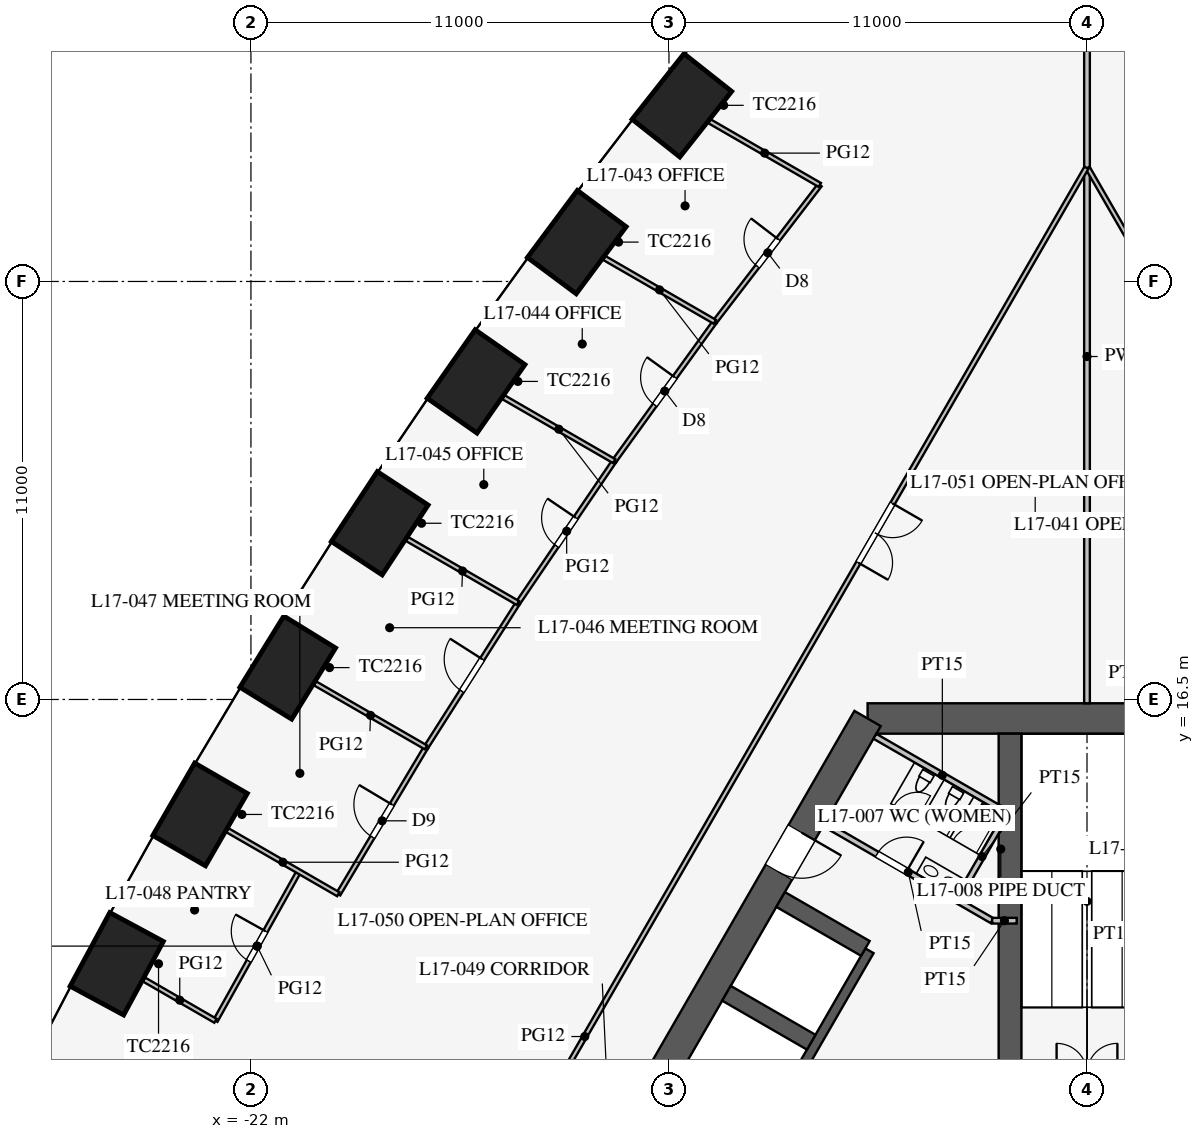
"""IFC4 building model, lengths in metres.
Left out: names, types, materials, properties, quantities, classifications, styles, units other than length and angle.
Written with IfcOpenShell. Run it as: python <this file> out.ifc"""

import sys

from ifc_helpers import new_model, si_unit, direction, frame, frame_2d, origin, origin_2d, place, context, subcontext, project, spatial, rectangle, extrude, element, fill, save


model = new_model("IFC4")
c1 = context("Model", 3, precision=1e-05, world=origin(), true_north=direction((0.0, 1.0)))
c2 = subcontext(c1, "Body", "Model", "MODEL_VIEW")
j1 = project(units=[si_unit("LENGTHUNIT", "METRE"), si_unit("PLANEANGLEUNIT", "RADIAN")], contexts=[c1])
p1 = place(None, origin())
s1 = spatial("IfcSite", under=j1, at=p1, CompositionType="ELEMENT")
p2 = place(p1, origin())
s2 = spatial("IfcBuilding", under=s1, at=p2, CompositionType="ELEMENT")
p3 = place(p2, frame((0.0, 0.0, 75.3)))
s3 = spatial("IfcBuildingStorey", under=s2, at=p3, CompositionType="ELEMENT", Elevation=75.3)
for number, where, z_axis, x_axis in (
    (1, (-10.66, 32.135, 0.0), (0.0, 0.0, 1.0), (-0.62, -0.784, 0.0)),
    (2, (-13.426, 28.536, 0.0), (0.0, 0.0, 1.0), (-0.597, -0.802, 0.0)),
    (3, (-16.076, 24.87, 0.0), (0.0, 0.0, 1.0), (-0.574, -0.819, 0.0)),
    (4, (-18.611, 21.137, 0.0), (0.0, 0.0, 1.0), (-0.549, -0.836, 0.0)),
    (5, (-21.031, 17.339, 0.0), (0.0, 0.0, 1.0), (-0.525, -0.851, 0.0)),
    (6, (-23.338, 13.474, 0.0), (0.0, 0.0, 1.0), (-0.5, -0.866, 0.0)),
    (7, (-25.531, 9.544, 0.0), (0.0, 0.0, 1.0), (-0.475, -0.88, 0.0)),
):
    element("IfcColumn", number, at=place(p3, frame(where, z_axis=z_axis, x_axis=x_axis)), inside=s3, PredefinedType="COLUMN", context=c2, shape_type="SweptSolid", body=[
        extrude(rectangle(XDim=2.2, YDim=1.6, at=origin_2d()), origin(), (0.0, 0.0, 1.0), 4.2),
    ])
p4 = place(p3, frame((5.773, 16.0, 0.0), z_axis=(0.0, 0.0, 1.0), x_axis=(-1.0, 0.0, 0.0)))
e8 = element("IfcWall", 8, at=p4, inside=s3, PredefinedType="SHEAR", context=c2, shape_type="SweptSolid", body=[
    extrude(rectangle(XDim=11.547, YDim=0.8, at=frame_2d((5.773, 0.0))), origin(), (0.0, 0.0, 1.0), 4.2),
])
p5 = place(p3, frame((-5.773, 16.0, 0.0), z_axis=(0.0, 0.0, 1.0), x_axis=(-0.500002442456, -0.866023993627, 0.0)))
e9 = element("IfcWall", 9, at=p5, inside=s3, PredefinedType="SHEAR", context=c2, shape_type="SweptSolid", body=[
    extrude(rectangle(XDim=21.939, YDim=0.8, at=frame_2d((10.97, 0.0))), origin(), (0.0, 0.0, 1.0), 4.2),
])
p6 = place(p5, frame((17.27, 0.0, 0.0)))
e10 = element("IfcOpeningElement", 10, at=p6, cuts=e9, PredefinedType="OPENING", context=c2, shape_type="SweptSolid", body=[
    extrude(rectangle(XDim=1.2, YDim=2.1, at=frame_2d((0.6, 1.05))), frame((0.0, 0.41, 0.0), z_axis=(0.0, -1.0, 0.0), x_axis=(1.0, 0.0, 0.0)), (0.0, 0.0, 1.0), 0.82),
])
p7 = place(p5, frame((3.47, 0.0, 0.0)))
e11 = element("IfcOpeningElement", 11, at=p7, cuts=e9, PredefinedType="OPENING", context=c2, shape_type="SweptSolid", body=[
    extrude(rectangle(XDim=1.2, YDim=2.1, at=frame_2d((0.6, 1.05))), frame((0.0, 0.41, 0.0), z_axis=(0.0, -1.0, 0.0), x_axis=(1.0, 0.0, 0.0)), (0.0, 0.0, 1.0), 0.82),
])
p8 = place(p3, frame((-5.724, 9.886, 0.0), z_axis=(0.0, 0.0, 1.0), x_axis=(-0.500001763848, -0.866024385424, 0.0)))
e12 = element("IfcWall", 12, at=p8, inside=s3, PredefinedType="SHEAR", context=c2, shape_type="SweptSolid", body=[
    extrude(rectangle(XDim=11.4, YDim=0.25, at=frame_2d((5.7, 0.0))), origin(), (0.0, 0.0, 1.0), 4.2),
])
p9 = place(p8, frame((6.525, 0.0, 0.0)))
e13 = element("IfcOpeningElement", 13, at=p9, cuts=e12, PredefinedType="OPENING", context=c2, shape_type="SweptSolid", body=[
    extrude(rectangle(XDim=1.2, YDim=2.2, at=frame_2d((0.6, 1.1))), frame((0.0, 0.135, 0.0), z_axis=(0.0, -1.0, 0.0), x_axis=(1.0, 0.0, 0.0)), (0.0, 0.0, 1.0), 0.27),
])
p10 = place(p8, frame((9.375, 0.0, 0.0)))
e14 = element("IfcOpeningElement", 14, at=p10, cuts=e12, PredefinedType="OPENING", context=c2, shape_type="SweptSolid", body=[
    extrude(rectangle(XDim=1.2, YDim=2.2, at=frame_2d((0.6, 1.1))), frame((0.0, 0.135, 0.0), z_axis=(0.0, -1.0, 0.0), x_axis=(1.0, 0.0, 0.0)), (0.0, 0.0, 1.0), 0.27),
])
p11 = place(p3, frame((-5.832, 9.949, 0.0), z_axis=(0.0, 0.0, 1.0), x_axis=(-0.866029291668, 0.499993265928, 0.0)))
e15 = element("IfcWall", 15, at=p11, inside=s3, PredefinedType="SHEAR", context=c2, shape_type="SweptSolid", body=[
    extrude(rectangle(XDim=2.575, YDim=0.45, at=frame_2d((1.288, 0.0))), origin(), (0.0, 0.0, 1.0), 4.2),
])
p12 = place(p3, frame((-7.257, 7.481, 0.0), z_axis=(0.0, 0.0, 1.0), x_axis=(-0.866046643894, 0.499963209246, 0.0)))
e16 = element("IfcWall", 16, at=p12, inside=s3, PredefinedType="SHEAR", context=c2, shape_type="SweptSolid", body=[
    extrude(rectangle(XDim=2.575, YDim=0.45, at=frame_2d((1.288, 0.0))), origin(), (0.0, 0.0, 1.0), 4.2),
])
p13 = place(p3, frame((-2.025, 6.525, 0.0), z_axis=(0.0, 0.0, 1.0), x_axis=(0.0, 1.0, 0.0)))
e17 = element("IfcWall", 17, at=p13, inside=s3, PredefinedType="SHEAR", context=c2, shape_type="SweptSolid", body=[
    extrude(rectangle(XDim=9.075, YDim=0.6, at=frame_2d((4.538, 0.0))), origin(), (0.0, 0.0, 1.0), 4.2),
])
p14 = place(p3, frame((-2.495, 10.678, 0.0), z_axis=(0.0, 0.0, 1.0), x_axis=(-0.86602216432, 0.500005610874, 0.0)))
e18 = element("IfcWall", 18, at=p14, inside=s3, PredefinedType="PARTITIONING", context=c2, shape_type="SweptSolid", body=[
    extrude(rectangle(XDim=5.1, YDim=0.15, at=frame_2d((2.55, 0.0))), origin(), (0.0, 0.0, 1.0), 4.0),
])
p15 = place(p14, frame((2.6, 0.0, 0.0)))
e19 = element("IfcOpeningElement", 19, at=p15, cuts=e18, PredefinedType="OPENING", context=c2, shape_type="SweptSolid", body=[
    extrude(rectangle(XDim=0.9, YDim=2.1, at=frame_2d((0.45, 1.05))), frame((0.0, 0.085, 0.0), z_axis=(0.0, -1.0, 0.0), x_axis=(1.0, 0.0, 0.0)), (0.0, 0.0, 1.0), 0.17),
])
p16 = place(p3, frame((-2.495, 10.678, 0.0), z_axis=(0.0, 0.0, 1.0), x_axis=(1.0, 0.0, 0.0)))
e20 = element("IfcWall", 20, at=p16, inside=s3, PredefinedType="PARTITIONING", context=c2, shape_type="SweptSolid", body=[
    extrude(rectangle(XDim=0.645, YDim=0.15, at=frame_2d((0.323, 0.0))), origin(), (0.0, 0.0, 1.0), 4.0),
])
p17 = place(p3, frame((-2.031, 13.482, 0.0), z_axis=(0.0, 0.0, 1.0), x_axis=(-0.866050731258, 0.499956128963, 0.0)))
e21 = element("IfcWall", 21, at=p17, inside=s3, PredefinedType="PARTITIONING", context=c2, shape_type="SweptSolid", body=[
    extrude(rectangle(XDim=4.1, YDim=0.15, at=frame_2d((2.05, 0.0))), origin(), (0.0, 0.0, 1.0), 4.0),
])
p18 = place(p3, frame((-3.389, 11.281, 0.0), z_axis=(0.0, 0.0, 1.0), x_axis=(0.499989096993, 0.866031698547, 0.0)))
e22 = element("IfcWall", 22, at=p18, inside=s3, PredefinedType="PARTITIONING", context=c2, shape_type="SweptSolid", body=[
    extrude(rectangle(XDim=2.51, YDim=0.15, at=frame_2d((1.255, 0.0))), origin(), (0.0, 0.0, 1.0), 4.0),
])
p19 = place(p3, frame((0.0, 16.4, 0.0), z_axis=(0.0, 0.0, 1.0), x_axis=(0.0, 1.0, 0.0)))
e23 = element("IfcWall", 23, at=p19, inside=s3, PredefinedType="PARTITIONING", context=c2, shape_type="SweptSolid", body=[
    extrude(rectangle(XDim=18.25, YDim=0.15, at=frame_2d((9.125, 0.0))), origin(), (0.0, 0.0, 1.0), 2.3),
])
p20 = place(p3, frame((26.415, -15.231, 0.0), z_axis=(0.0, 0.0, 1.0), x_axis=(-0.50000091641, 0.866024874695, 0.0)))
e24 = element("IfcWall", 24, at=p20, inside=s3, PredefinedType="PARTITIONING", context=c2, shape_type="SweptSolid", body=[
    extrude(rectangle(XDim=52.796, YDim=0.12, at=frame_2d((26.398, 0.0))), origin(), (0.0, 0.0, 1.0), 2.9),
])
p21 = place(p20, frame((10.2, 0.0, 0.15)))
e25 = element("IfcOpeningElement", 25, at=p21, cuts=e24, PredefinedType="OPENING", context=c2, shape_type="SweptSolid", body=[
    extrude(rectangle(XDim=1.8, YDim=2.1, at=frame_2d((0.9, 1.05))), frame((0.0, 0.07, 0.0), z_axis=(0.0, -1.0, 0.0), x_axis=(1.0, 0.0, 0.0)), (0.0, 0.0, 1.0), 0.14),
])
p22 = place(p20, frame((40.8, 0.0, 0.15)))
e26 = element("IfcOpeningElement", 26, at=p22, cuts=e24, PredefinedType="OPENING", context=c2, shape_type="SweptSolid", body=[
    extrude(rectangle(XDim=1.8, YDim=2.1, at=frame_2d((0.9, 1.05))), frame((0.0, 0.07, 0.0), z_axis=(0.0, -1.0, 0.0), x_axis=(1.0, 0.0, 0.0)), (0.0, 0.0, 1.0), 0.14),
])
p23 = place(p3, frame((-0.016, 30.491, 0.0), z_axis=(0.0, 0.0, 1.0), x_axis=(-0.50000091641, -0.866024874695, 0.0)))
e27 = element("IfcWall", 27, at=p23, inside=s3, PredefinedType="PARTITIONING", context=c2, shape_type="SweptSolid", body=[
    extrude(rectangle(XDim=52.796, YDim=0.12, at=frame_2d((26.398, 0.0))), origin(), (0.0, 0.0, 1.0), 2.9),
])
p24 = place(p23, frame((10.2, 0.0, 0.15)))
e28 = element("IfcOpeningElement", 28, at=p24, cuts=e27, PredefinedType="OPENING", context=c2, shape_type="SweptSolid", body=[
    extrude(rectangle(XDim=1.8, YDim=2.1, at=frame_2d((0.9, 1.05))), frame((0.0, 0.07, 0.0), z_axis=(0.0, -1.0, 0.0), x_axis=(1.0, 0.0, 0.0)), (0.0, 0.0, 1.0), 0.14),
])
p25 = place(p23, frame((40.8, 0.0, 0.15)))
e29 = element("IfcOpeningElement", 29, at=p25, cuts=e27, PredefinedType="OPENING", context=c2, shape_type="SweptSolid", body=[
    extrude(rectangle(XDim=1.8, YDim=2.1, at=frame_2d((0.9, 1.05))), frame((0.0, 0.07, 0.0), z_axis=(0.0, -1.0, 0.0), x_axis=(1.0, 0.0, 0.0)), (0.0, 0.0, 1.0), 0.14),
])
p26 = place(p3, frame((-20.74, 11.974, 0.0), z_axis=(0.0, 0.0, 1.0), x_axis=(-0.487373854787, -0.873193406795, 0.0)))
e30 = element("IfcWall", 30, at=p26, inside=s3, PredefinedType="PARTITIONING", context=c2, shape_type="SweptSolid", body=[
    extrude(rectangle(XDim=4.5, YDim=0.12, at=frame_2d((2.25, 0.0))), origin(), (0.0, 0.0, 1.0), 2.9),
])
p27 = place(p26, frame((1.8, 0.0, 0.15)))
e31 = element("IfcOpeningElement", 31, at=p27, cuts=e30, PredefinedType="OPENING", context=c2, shape_type="SweptSolid", body=[
    extrude(rectangle(XDim=0.9, YDim=2.1, at=frame_2d((0.45, 1.05))), frame((0.0, 0.07, 0.0), z_axis=(0.0, -1.0, 0.0), x_axis=(1.0, 0.0, 0.0)), (0.0, 0.0, 1.0), 0.14),
])
p28 = place(p3, frame((-12.441, 22.771, 0.0), z_axis=(0.0, 0.0, 1.0), x_axis=(-0.561512004239, -0.827468591002, 0.0)))
e32 = element("IfcWall", 32, at=p28, inside=s3, PredefinedType="PARTITIONING", context=c2, shape_type="SweptSolid", body=[
    extrude(rectangle(XDim=4.512, YDim=0.12, at=frame_2d((2.256, 0.0))), origin(), (0.0, 0.0, 1.0), 2.9),
])
p29 = place(p28, frame((1.8, 0.0, 0.15)))
e33 = element("IfcOpeningElement", 33, at=p29, cuts=e32, PredefinedType="OPENING", context=c2, shape_type="SweptSolid", body=[
    extrude(rectangle(XDim=0.9, YDim=2.1, at=frame_2d((0.45, 1.05))), frame((0.0, 0.07, 0.0), z_axis=(0.0, -1.0, 0.0), x_axis=(1.0, 0.0, 0.0)), (0.0, 0.0, 1.0), 0.14),
])
p30 = place(p3, frame((-9.793, 26.439, 0.0), z_axis=(0.0, 0.0, 1.0), x_axis=(-0.585376255171, -0.810761765183, 0.0)))
e34 = element("IfcWall", 34, at=p30, inside=s3, PredefinedType="PARTITIONING", context=c2, shape_type="SweptSolid", body=[
    extrude(rectangle(XDim=4.523, YDim=0.12, at=frame_2d((2.262, 0.0))), origin(), (0.0, 0.0, 1.0), 2.9),
])
p31 = place(p30, frame((1.8, 0.0, 0.15)))
e35 = element("IfcOpeningElement", 35, at=p31, cuts=e34, PredefinedType="OPENING", context=c2, shape_type="SweptSolid", body=[
    extrude(rectangle(XDim=0.9, YDim=2.1, at=frame_2d((0.45, 1.05))), frame((0.0, 0.07, 0.0), z_axis=(0.0, -1.0, 0.0), x_axis=(1.0, 0.0, 0.0)), (0.0, 0.0, 1.0), 0.14),
])
p32 = place(p3, frame((-7.03, 30.04, 0.0), z_axis=(0.0, 0.0, 1.0), x_axis=(-0.608784932975, -0.79333530451, 0.0)))
e36 = element("IfcWall", 36, at=p32, inside=s3, PredefinedType="PARTITIONING", context=c2, shape_type="SweptSolid", body=[
    extrude(rectangle(XDim=4.539, YDim=0.12, at=frame_2d((2.27, 0.0))), origin(), (0.0, 0.0, 1.0), 2.9),
])
p33 = place(p32, frame((1.8, 0.0, 0.15)))
e37 = element("IfcOpeningElement", 37, at=p33, cuts=e36, PredefinedType="OPENING", context=c2, shape_type="SweptSolid", body=[
    extrude(rectangle(XDim=0.9, YDim=2.1, at=frame_2d((0.45, 1.05))), frame((0.0, 0.07, 0.0), z_axis=(0.0, -1.0, 0.0), x_axis=(1.0, 0.0, 0.0)), (0.0, 0.0, 1.0), 0.14),
])
p34 = place(p3, frame((-17.395, 15.239, 0.0), z_axis=(0.0, 0.0, 1.0), x_axis=(-0.512483962191, -0.858696796604, 0.0)))
e38 = element("IfcWall", 38, at=p34, inside=s3, PredefinedType="PARTITIONING", context=c2, shape_type="SweptSolid", body=[
    extrude(rectangle(XDim=4.5, YDim=0.12, at=frame_2d((2.25, 0.0))), origin(), (0.0, 0.0, 1.0), 2.9),
])
p35 = place(p34, frame((1.75, 0.0, 0.15)))
e39 = element("IfcOpeningElement", 39, at=p35, cuts=e38, PredefinedType="OPENING", context=c2, shape_type="SweptSolid", body=[
    extrude(rectangle(XDim=1.0, YDim=2.1, at=frame_2d((0.5, 1.05))), frame((0.0, 0.07, 0.0), z_axis=(0.0, -1.0, 0.0), x_axis=(1.0, 0.0, 0.0)), (0.0, 0.0, 1.0), 0.14),
])
p36 = place(p3, frame((-14.975, 19.038, 0.0), z_axis=(0.0, 0.0, 1.0), x_axis=(-0.537243691336, -0.843427066272, 0.0)))
e40 = element("IfcWall", 40, at=p36, inside=s3, PredefinedType="PARTITIONING", context=c2, shape_type="SweptSolid", body=[
    extrude(rectangle(XDim=4.504, YDim=0.12, at=frame_2d((2.252, 0.0))), origin(), (0.0, 0.0, 1.0), 2.9),
])
p37 = place(p36, frame((1.75, 0.0, 0.15)))
e41 = element("IfcOpeningElement", 41, at=p37, cuts=e40, PredefinedType="OPENING", context=c2, shape_type="SweptSolid", body=[
    extrude(rectangle(XDim=1.0, YDim=2.1, at=frame_2d((0.5, 1.05))), frame((0.0, 0.07, 0.0), z_axis=(0.0, -1.0, 0.0), x_axis=(1.0, 0.0, 0.0)), (0.0, 0.0, 1.0), 0.14),
])
p38 = place(p3, frame((-19.701, 11.374, 0.0), z_axis=(0.0, 0.0, 1.0), x_axis=(-0.866014270972, 0.500019282102, 0.0)))
e42 = element("IfcWall", 42, at=p38, inside=s3, PredefinedType="PARTITIONING", context=c2, shape_type="SweptSolid", body=[
    extrude(rectangle(XDim=3.37, YDim=0.12, at=frame_2d((1.685, 0.0))), origin(), (0.0, 0.0, 1.0), 2.8),
])
p39 = place(p3, frame((-22.934, 8.045, 0.0), z_axis=(0.0, 0.0, 1.0), x_axis=(-0.866060019146, 0.499940039642, 0.0)))
e43 = element("IfcWall", 43, at=p39, inside=s3, PredefinedType="PARTITIONING", context=c2, shape_type="SweptSolid", body=[
    extrude(rectangle(XDim=2.169, YDim=0.12, at=frame_2d((1.084, 0.0))), origin(), (0.0, 0.0, 1.0), 2.8),
])
p40 = place(p3, frame((-12.441, 22.771, 0.0), z_axis=(0.0, 0.0, 1.0), x_axis=(-0.865992196602, 0.500057512117, 0.0)))
e44 = element("IfcWall", 44, at=p40, inside=s3, PredefinedType="PARTITIONING", context=c2, shape_type="SweptSolid", body=[
    extrude(rectangle(XDim=3.364, YDim=0.12, at=frame_2d((1.682, 0.0))), origin(), (0.0, 0.0, 1.0), 2.6),
])
p41 = place(p3, frame((-9.793, 26.439, 0.0), z_axis=(0.0, 0.0, 1.0), x_axis=(-0.866029446706, 0.499992997389, 0.0)))
e45 = element("IfcWall", 45, at=p41, inside=s3, PredefinedType="PARTITIONING", context=c2, shape_type="SweptSolid", body=[
    extrude(rectangle(XDim=3.359, YDim=0.12, at=frame_2d((1.679, 0.0))), origin(), (0.0, 0.0, 1.0), 2.6),
])
p42 = place(p3, frame((-7.03, 30.04, 0.0), z_axis=(0.0, 0.0, 1.0), x_axis=(-0.866038859646, 0.49997669304, 0.0)))
e46 = element("IfcWall", 46, at=p42, inside=s3, PredefinedType="PARTITIONING", context=c2, shape_type="SweptSolid", body=[
    extrude(rectangle(XDim=3.353, YDim=0.12, at=frame_2d((1.676, 0.0))), origin(), (0.0, 0.0, 1.0), 2.8),
])
p43 = place(p3, frame((-17.395, 15.239, 0.0), z_axis=(0.0, 0.0, 1.0), x_axis=(-0.865991297194, 0.500059069696, 0.0)))
e47 = element("IfcWall", 47, at=p43, inside=s3, PredefinedType="PARTITIONING", context=c2, shape_type="SweptSolid", body=[
    extrude(rectangle(XDim=3.369, YDim=0.12, at=frame_2d((1.685, 0.0))), origin(), (0.0, 0.0, 1.0), 2.8),
])
p44 = place(p3, frame((-14.975, 19.038, 0.0), z_axis=(0.0, 0.0, 1.0), x_axis=(-0.866039498442, 0.499975586543, 0.0)))
e48 = element("IfcWall", 48, at=p44, inside=s3, PredefinedType="PARTITIONING", context=c2, shape_type="SweptSolid", body=[
    extrude(rectangle(XDim=3.367, YDim=0.12, at=frame_2d((1.684, 0.0))), origin(), (0.0, 0.0, 1.0), 2.8),
])
p45 = place(p15, frame((0.9, 0.0, 0.0), z_axis=(0.0, 0.0, 1.0), x_axis=(-1.0, 0.0, 0.0)))
e49 = element("IfcDoor", 49, at=p45, inside=s3, OperationType="SINGLE_SWING_RIGHT", PredefinedType="DOOR", context=c2, shape_type="SweptSolid", body=[
    extrude(rectangle(XDim=0.9, YDim=2.1, at=frame_2d((0.45, 1.05))), frame((0.0, 0.025, 0.0), z_axis=(0.0, -1.0, 0.0), x_axis=(1.0, 0.0, 0.0)), (0.0, 0.0, 1.0), 0.05),
])
fill(e19, e49)
p46 = place(p7, origin())
e50 = element("IfcDoor", 50, at=p46, inside=s3, OperationType="SINGLE_SWING_LEFT", PredefinedType="DOOR", context=c2, shape_type="SweptSolid", body=[
    extrude(rectangle(XDim=1.2, YDim=2.1, at=frame_2d((0.6, 1.05))), frame((0.0, 0.025, 0.0), z_axis=(0.0, -1.0, 0.0), x_axis=(1.0, 0.0, 0.0)), (0.0, 0.0, 1.0), 0.05),
])
fill(e11, e50)
p47 = place(p33, frame((0.9, 0.0, 0.0), z_axis=(0.0, 0.0, 1.0), x_axis=(-1.0, 0.0, 0.0)))
e51 = element("IfcDoor", 51, at=p47, inside=s3, OperationType="SINGLE_SWING_RIGHT", PredefinedType="DOOR", context=c2, shape_type="SweptSolid", body=[
    extrude(rectangle(XDim=0.9, YDim=2.1, at=frame_2d((0.45, 1.05))), frame((0.0, 0.025, 0.0), z_axis=(0.0, -1.0, 0.0), x_axis=(1.0, 0.0, 0.0)), (0.0, 0.0, 1.0), 0.05),
])
fill(e37, e51)
p48 = place(p31, frame((0.9, 0.0, 0.0), z_axis=(0.0, 0.0, 1.0), x_axis=(-1.0, 0.0, 0.0)))
e52 = element("IfcDoor", 52, at=p48, inside=s3, OperationType="SINGLE_SWING_RIGHT", PredefinedType="DOOR", context=c2, shape_type="SweptSolid", body=[
    extrude(rectangle(XDim=0.9, YDim=2.1, at=frame_2d((0.45, 1.05))), frame((0.0, 0.025, 0.0), z_axis=(0.0, -1.0, 0.0), x_axis=(1.0, 0.0, 0.0)), (0.0, 0.0, 1.0), 0.05),
])
fill(e35, e52)
p49 = place(p29, frame((0.9, 0.0, 0.0), z_axis=(0.0, 0.0, 1.0), x_axis=(-1.0, 0.0, 0.0)))
e53 = element("IfcDoor", 53, at=p49, inside=s3, OperationType="SINGLE_SWING_RIGHT", PredefinedType="DOOR", context=c2, shape_type="SweptSolid", body=[
    extrude(rectangle(XDim=0.9, YDim=2.1, at=frame_2d((0.45, 1.05))), frame((0.0, 0.025, 0.0), z_axis=(0.0, -1.0, 0.0), x_axis=(1.0, 0.0, 0.0)), (0.0, 0.0, 1.0), 0.05),
])
fill(e33, e53)
p50 = place(p37, frame((1.0, 0.0, 0.0), z_axis=(0.0, 0.0, 1.0), x_axis=(-1.0, 0.0, 0.0)))
e54 = element("IfcDoor", 54, at=p50, inside=s3, OperationType="SINGLE_SWING_RIGHT", PredefinedType="DOOR", context=c2, shape_type="SweptSolid", body=[
    extrude(rectangle(XDim=1.0, YDim=2.1, at=frame_2d((0.5, 1.05))), frame((0.0, 0.025, 0.0), z_axis=(0.0, -1.0, 0.0), x_axis=(1.0, 0.0, 0.0)), (0.0, 0.0, 1.0), 0.05),
])
fill(e41, e54)
p51 = place(p35, frame((1.0, 0.0, 0.0), z_axis=(0.0, 0.0, 1.0), x_axis=(-1.0, 0.0, 0.0)))
e55 = element("IfcDoor", 55, at=p51, inside=s3, OperationType="SINGLE_SWING_RIGHT", PredefinedType="DOOR", context=c2, shape_type="SweptSolid", body=[
    extrude(rectangle(XDim=1.0, YDim=2.1, at=frame_2d((0.5, 1.05))), frame((0.0, 0.025, 0.0), z_axis=(0.0, -1.0, 0.0), x_axis=(1.0, 0.0, 0.0)), (0.0, 0.0, 1.0), 0.05),
])
fill(e39, e55)
p52 = place(p27, frame((0.9, 0.0, 0.0), z_axis=(0.0, 0.0, 1.0), x_axis=(-1.0, 0.0, 0.0)))
e56 = element("IfcDoor", 56, at=p52, inside=s3, OperationType="SINGLE_SWING_RIGHT", PredefinedType="DOOR", context=c2, shape_type="SweptSolid", body=[
    extrude(rectangle(XDim=0.9, YDim=2.1, at=frame_2d((0.45, 1.05))), frame((0.0, 0.025, 0.0), z_axis=(0.0, -1.0, 0.0), x_axis=(1.0, 0.0, 0.0)), (0.0, 0.0, 1.0), 0.05),
])
fill(e31, e56)
p53 = place(p24, origin())
e57 = element("IfcDoor", 57, at=p53, inside=s3, OperationType="DOUBLE_DOOR_SINGLE_SWING", PredefinedType="DOOR", context=c2, shape_type="SweptSolid", body=[
    extrude(rectangle(XDim=1.8, YDim=2.1, at=frame_2d((0.9, 1.05))), frame((0.0, 0.025, 0.0), z_axis=(0.0, -1.0, 0.0), x_axis=(1.0, 0.0, 0.0)), (0.0, 0.0, 1.0), 0.05),
])
fill(e28, e57)
save(model, sys.argv[1])
